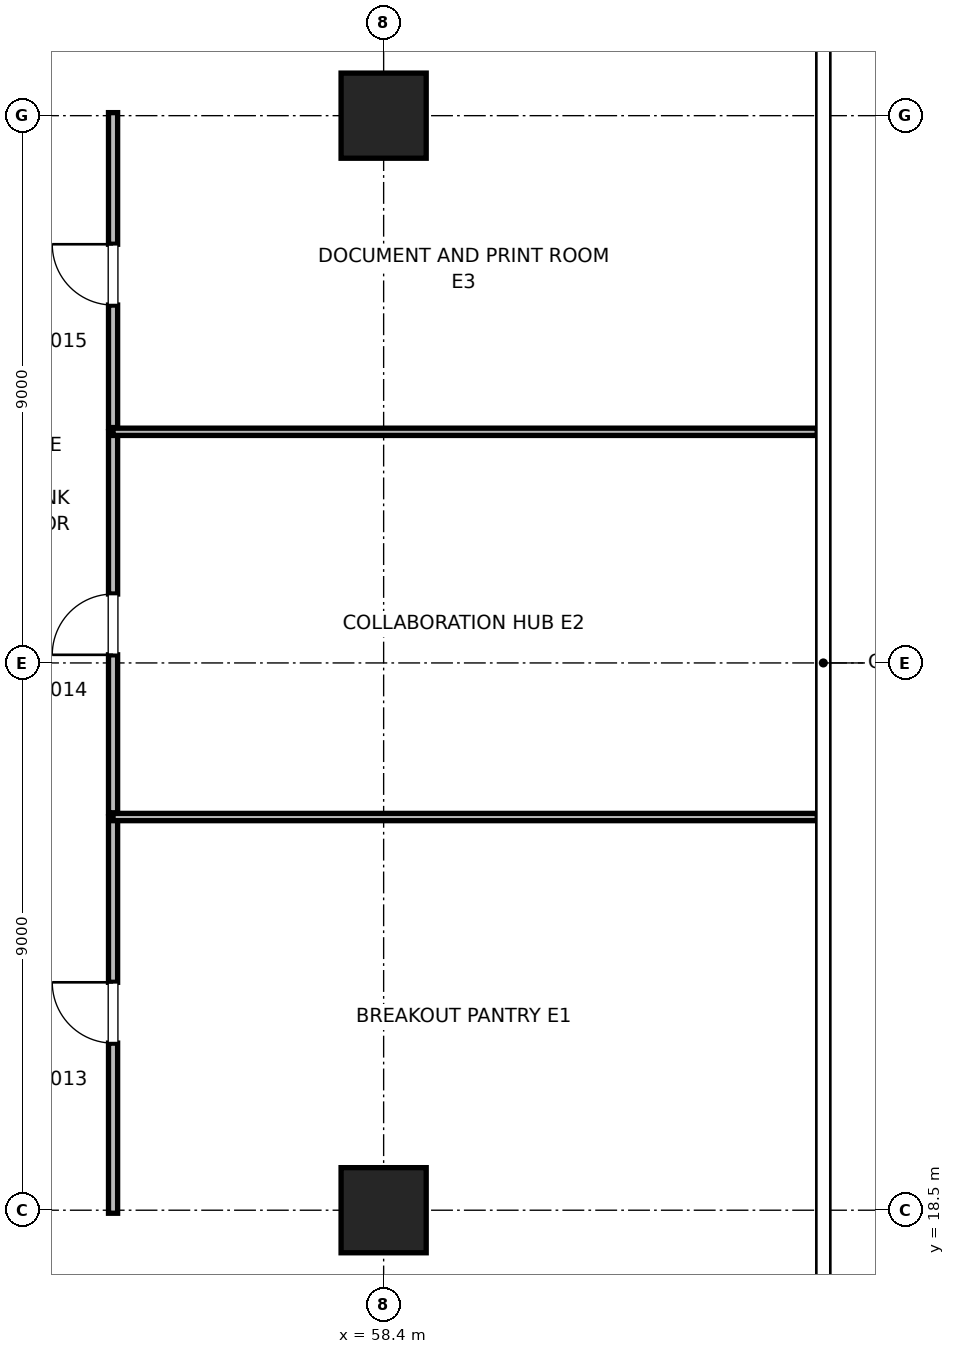
"""IFC4 building model, lengths in metres.
Left out: names, types, materials, properties, quantities, classifications, styles, units other than length and angle.
Written with IfcOpenShell. Run it as: python <this file> out.ifc"""

import sys

from ifc_helpers import new_model, si_unit, direction, frame, frame_2d, origin, origin_2d, place, context, subcontext, project, spatial, rectangle, extrude, element, fill, save


model = new_model("IFC4")
c1 = context("Model", 3, precision=1e-05, world=origin(), true_north=direction((0.0, 1.0)))
c2 = subcontext(c1, "Body", "Model", "MODEL_VIEW")
j1 = project(units=[si_unit("LENGTHUNIT", "METRE"), si_unit("PLANEANGLEUNIT", "RADIAN")], contexts=[c1])
p1 = place(None, origin())
s1 = spatial("IfcSite", under=j1, at=p1, CompositionType="ELEMENT")
p2 = place(p1, origin())
s2 = spatial("IfcBuilding", under=s1, at=p2, CompositionType="ELEMENT")
p3 = place(p2, frame((0.0, 0.0, 221.2)))
s3 = spatial("IfcBuildingStorey", under=s2, at=p3, CompositionType="ELEMENT", Elevation=221.2)
for number, where, z_axis, x_axis in (
    (1, (58.4, 18.5, 0.0), (0.0, 0.0, 1.0), (1.0, 0.0, 0.0)),
    (2, (58.4, 36.5, 0.0), (0.0, 0.0, 1.0), (1.0, 0.0, 0.0)),
):
    element("IfcColumn", number, at=place(p3, frame(where, z_axis=z_axis, x_axis=x_axis)), inside=s3, PredefinedType="COLUMN", context=c2, shape_type="SweptSolid", body=[
        extrude(rectangle(XDim=1.4, YDim=1.4, at=origin_2d()), origin(), (0.0, 0.0, 1.0), 4.0),
    ])
p4 = place(p3, frame((53.95, 18.45, 0.0), z_axis=(0.0, 0.0, 1.0), x_axis=(0.0, 1.0, 0.0)))
e3 = element("IfcWall", 3, at=p4, inside=s3, PredefinedType="PARTITIONING", context=c2, shape_type="SweptSolid", body=[
    extrude(rectangle(XDim=6.516, YDim=0.15, at=frame_2d((3.258, 0.0))), origin(), (0.0, 0.0, 1.0), 2.85),
])
p5 = place(p4, frame((2.798, 0.0, 0.0)))
e4 = element("IfcOpeningElement", 4, at=p5, cuts=e3, PredefinedType="OPENING", context=c2, shape_type="SweptSolid", body=[
    extrude(rectangle(XDim=1.0, YDim=2.15, at=frame_2d((0.5, 1.075))), frame((0.0, 0.075, 0.0), z_axis=(0.0, -1.0, 0.0), x_axis=(1.0, 0.0, 0.0)), (0.0, 0.0, 1.0), 0.15),
])
p6 = place(p3, frame((53.95, 24.966, 0.0), z_axis=(0.0, 0.0, 1.0), x_axis=(1.0, 0.0, 0.0)))
e5 = element("IfcWall", 5, at=p6, inside=s3, PredefinedType="PARTITIONING", context=c2, shape_type="SweptSolid", body=[
    extrude(rectangle(XDim=11.581, YDim=0.12, at=frame_2d((5.791, 0.0))), origin(), (0.0, 0.0, 1.0), 2.85),
])
p7 = place(p3, frame((53.95, 25.036, 0.0), z_axis=(0.0, 0.0, 1.0), x_axis=(0.0, 1.0, 0.0)))
e6 = element("IfcWall", 6, at=p7, inside=s3, PredefinedType="PARTITIONING", context=c2, shape_type="SweptSolid", body=[
    extrude(rectangle(XDim=6.265, YDim=0.15, at=frame_2d((3.133, 0.0))), origin(), (0.0, 0.0, 1.0), 2.85),
])
p8 = place(p7, frame((2.597, 0.0, 0.0)))
e7 = element("IfcOpeningElement", 7, at=p8, cuts=e6, PredefinedType="OPENING", context=c2, shape_type="SweptSolid", body=[
    extrude(rectangle(XDim=1.0, YDim=2.15, at=frame_2d((0.5, 1.075))), frame((0.0, 0.075, 0.0), z_axis=(0.0, -1.0, 0.0), x_axis=(1.0, 0.0, 0.0)), (0.0, 0.0, 1.0), 0.15),
])
p9 = place(p3, frame((53.95, 31.301, 0.0), z_axis=(0.0, 0.0, 1.0), x_axis=(1.0, 0.0, 0.0)))
e8 = element("IfcWall", 8, at=p9, inside=s3, PredefinedType="PARTITIONING", context=c2, shape_type="SweptSolid", body=[
    extrude(rectangle(XDim=11.581, YDim=0.12, at=frame_2d((5.791, 0.0))), origin(), (0.0, 0.0, 1.0), 2.85),
])
p10 = place(p3, frame((53.95, 31.371, 0.0), z_axis=(0.0, 0.0, 1.0), x_axis=(0.0, 1.0, 0.0)))
e9 = element("IfcWall", 9, at=p10, inside=s3, PredefinedType="PARTITIONING", context=c2, shape_type="SweptSolid", body=[
    extrude(rectangle(XDim=5.179, YDim=0.15, at=frame_2d((2.589, 0.0))), origin(), (0.0, 0.0, 1.0), 2.85),
])
p11 = place(p10, frame((2.014, 0.0, 0.0)))
e10 = element("IfcOpeningElement", 10, at=p11, cuts=e9, PredefinedType="OPENING", context=c2, shape_type="SweptSolid", body=[
    extrude(rectangle(XDim=1.0, YDim=2.15, at=frame_2d((0.5, 1.075))), frame((0.0, 0.075, 0.0), z_axis=(0.0, -1.0, 0.0), x_axis=(1.0, 0.0, 0.0)), (0.0, 0.0, 1.0), 0.15),
])
p12 = place(p5, origin())
e11 = element("IfcDoor", 11, at=p12, inside=s3, OperationType="SINGLE_SWING_RIGHT", PredefinedType="DOOR", context=c2, shape_type="SweptSolid", body=[
    extrude(rectangle(XDim=1.0, YDim=2.15, at=frame_2d((0.5, 1.075))), frame((0.0, 0.025, 0.0), z_axis=(0.0, -1.0, 0.0), x_axis=(1.0, 0.0, 0.0)), (0.0, 0.0, 1.0), 0.05),
])
fill(e4, e11)
p13 = place(p8, origin())
e12 = element("IfcDoor", 12, at=p13, inside=s3, OperationType="SINGLE_SWING_LEFT", PredefinedType="DOOR", context=c2, shape_type="SweptSolid", body=[
    extrude(rectangle(XDim=1.0, YDim=2.15, at=frame_2d((0.5, 1.075))), frame((0.0, 0.025, 0.0), z_axis=(0.0, -1.0, 0.0), x_axis=(1.0, 0.0, 0.0)), (0.0, 0.0, 1.0), 0.05),
])
fill(e7, e12)
p14 = place(p11, origin())
e13 = element("IfcDoor", 13, at=p14, inside=s3, OperationType="SINGLE_SWING_RIGHT", PredefinedType="DOOR", context=c2, shape_type="SweptSolid", body=[
    extrude(rectangle(XDim=1.0, YDim=2.15, at=frame_2d((0.5, 1.075))), frame((0.0, 0.025, 0.0), z_axis=(0.0, -1.0, 0.0), x_axis=(1.0, 0.0, 0.0)), (0.0, 0.0, 1.0), 0.05),
])
fill(e10, e13)
save(model, sys.argv[1])
